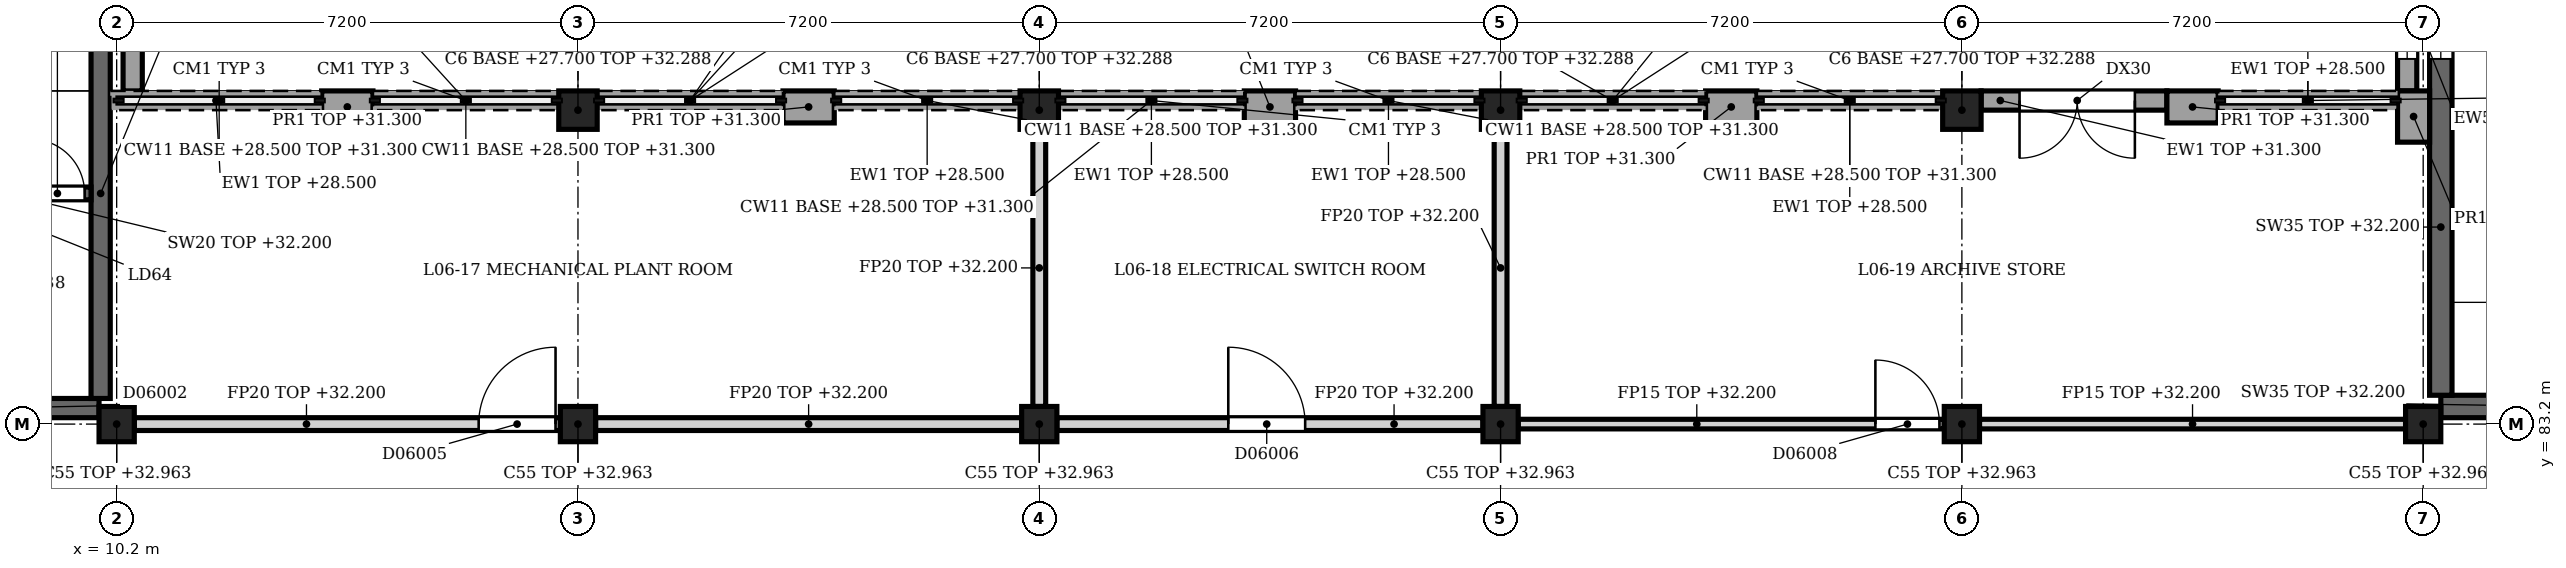
"""IFC4 building model, lengths in metres.
Left out: names, types, materials, properties, quantities, classifications, styles, units other than length and angle.
Written with IfcOpenShell. Run it as: python <this file> out.ifc"""

import sys

from ifc_helpers import new_model, si_unit, direction, frame, frame_2d, origin, origin_2d, place, context, subcontext, project, spatial, rectangle, extrude, element, fill, save


model = new_model("IFC4")
c1 = context("Model", 3, precision=1e-05, world=origin(), true_north=direction((0.0, 1.0)))
c2 = subcontext(c1, "Body", "Model", "MODEL_VIEW")
j1 = project(units=[si_unit("LENGTHUNIT", "METRE"), si_unit("PLANEANGLEUNIT", "RADIAN")], contexts=[c1])
p1 = place(None, origin())
s1 = spatial("IfcSite", under=j1, at=p1, CompositionType="ELEMENT")
p2 = place(p1, origin())
s2 = spatial("IfcBuilding", under=s1, at=p2, CompositionType="ELEMENT")
p3 = place(p2, frame((0.0, 0.0, 27.9)))
s3 = spatial("IfcBuildingStorey", under=s2, at=p3, CompositionType="ELEMENT", Elevation=27.9)
for number, where, z_axis, x_axis in (
    (1, (10.2, 83.2, 0.0), (0.0, 0.0, 1.0), (1.0, 0.0, 0.0)),
    (2, (17.4, 83.2, 0.0), (0.0, 0.0, 1.0), (1.0, 0.0, 0.0)),
    (3, (24.6, 83.2, 0.0), (0.0, 0.0, 1.0), (1.0, 0.0, 0.0)),
    (4, (31.8, 83.2, 0.0), (0.0, 0.0, 1.0), (1.0, 0.0, 0.0)),
    (5, (39.0, 83.2, 0.0), (0.0, 0.0, 1.0), (1.0, 0.0, 0.0)),
    (6, (46.2, 83.2, 0.0), (0.0, 0.0, 1.0), (1.0, 0.0, 0.0)),
):
    element("IfcColumn", number, at=place(p3, frame(where, z_axis=z_axis, x_axis=x_axis)), inside=s3, PredefinedType="COLUMN", context=c2, shape_type="SweptSolid", body=[
        extrude(rectangle(XDim=0.55, YDim=0.55, at=origin_2d()), origin(), (0.0, 0.0, 1.0), 5.063),
    ])
for number, where, z_axis, x_axis in (
    (7, (17.4, 88.1, -0.2), (0.0, 0.0, 1.0), (1.0, 0.0, 0.0)),
    (8, (24.6, 88.1, -0.2), (0.0, 0.0, 1.0), (1.0, 0.0, 0.0)),
    (9, (31.8, 88.1, -0.2), (0.0, 0.0, 1.0), (1.0, 0.0, 0.0)),
    (10, (39.0, 88.1, -0.2), (0.0, 0.0, 1.0), (1.0, 0.0, 0.0)),
):
    element("IfcColumn", number, at=place(p3, frame(where, z_axis=z_axis, x_axis=x_axis)), inside=s3, PredefinedType="COLUMN", context=c2, shape_type="SweptSolid", body=[
        extrude(rectangle(XDim=0.6, YDim=0.6, at=origin_2d()), origin(), (0.0, 0.0, 1.0), 4.588),
    ])
p4 = place(p3, frame((10.45, 90.0, 0.0), z_axis=(0.0, 0.0, 1.0), x_axis=(0.0, -1.0, 0.0)))
e11 = element("IfcWall", 11, at=p4, inside=s3, PredefinedType="SOLIDWALL", context=c2, shape_type="SweptSolid", body=[
    extrude(rectangle(XDim=1.6, YDim=0.3, at=frame_2d((0.8, 0.0))), origin(), (0.0, 0.0, 1.0), 3.4),
])
p5 = place(p3, frame((13.4, 88.15, 0.0), z_axis=(0.0, 0.0, 1.0), x_axis=(1.0, 0.0, 0.0)))
e12 = element("IfcWall", 12, at=p5, inside=s3, PredefinedType="SOLIDWALL", context=c2, shape_type="SweptSolid", body=[
    extrude(rectangle(XDim=0.8, YDim=0.5, at=frame_2d((0.4, 0.0))), origin(), (0.0, 0.0, 1.0), 3.4),
])
p6 = place(p3, frame((20.6, 88.15, 0.0), z_axis=(0.0, 0.0, 1.0), x_axis=(1.0, 0.0, 0.0)))
e13 = element("IfcWall", 13, at=p6, inside=s3, PredefinedType="SOLIDWALL", context=c2, shape_type="SweptSolid", body=[
    extrude(rectangle(XDim=0.8, YDim=0.5, at=frame_2d((0.4, 0.0))), origin(), (0.0, 0.0, 1.0), 3.4),
])
for number, where, z_axis, x_axis in (
    (14, (27.8, 88.15, 0.0), (0.0, 0.0, 1.0), (1.0, 0.0, 0.0)),
    (15, (35.0, 88.15, 0.0), (0.0, 0.0, 1.0), (1.0, 0.0, 0.0)),
    (16, (42.2, 88.15, 0.0), (0.0, 0.0, 1.0), (1.0, 0.0, 0.0)),
):
    element("IfcWall", number, at=place(p3, frame(where, z_axis=z_axis, x_axis=x_axis)), inside=s3, PredefinedType="SOLIDWALL", context=c2, shape_type="SweptSolid", body=[
        extrude(rectangle(XDim=0.8, YDim=0.5, at=frame_2d((0.4, 0.0))), origin(), (0.0, 0.0, 1.0), 3.4),
    ])
p7 = place(p3, frame((10.1, 88.25, 0.0), z_axis=(0.0, 0.0, 1.0), x_axis=(1.0, 0.0, 0.0)))
e17 = element("IfcWall", 17, at=p7, inside=s3, PredefinedType="SOLIDWALL", context=c2, shape_type="SweptSolid", body=[
    extrude(rectangle(XDim=3.3, YDim=0.3, at=frame_2d((1.65, 0.0))), origin(), (0.0, 0.0, 1.0), 0.6),
])
for number, where, z_axis, x_axis in (
    (18, (14.2, 88.25, 0.0), (0.0, 0.0, 1.0), (1.0, 0.0, 0.0)),
    (19, (17.7, 88.25, 0.0), (0.0, 0.0, 1.0), (1.0, 0.0, 0.0)),
    (20, (21.4, 88.25, 0.0), (0.0, 0.0, 1.0), (1.0, 0.0, 0.0)),
    (21, (24.9, 88.25, 0.0), (0.0, 0.0, 1.0), (1.0, 0.0, 0.0)),
):
    element("IfcWall", number, at=place(p3, frame(where, z_axis=z_axis, x_axis=x_axis)), inside=s3, PredefinedType="SOLIDWALL", context=c2, shape_type="SweptSolid", body=[
        extrude(rectangle(XDim=2.9, YDim=0.3, at=frame_2d((1.45, 0.0))), origin(), (0.0, 0.0, 1.0), 0.6),
    ])
for number, where, z_axis, x_axis in (
    (22, (28.6, 88.25, 0.0), (0.0, 0.0, 1.0), (1.0, 0.0, 0.0)),
    (23, (32.1, 88.25, 0.0), (0.0, 0.0, 1.0), (1.0, 0.0, 0.0)),
    (24, (35.8, 88.25, 0.0), (0.0, 0.0, 1.0), (1.0, 0.0, 0.0)),
):
    element("IfcWall", number, at=place(p3, frame(where, z_axis=z_axis, x_axis=x_axis)), inside=s3, PredefinedType="SOLIDWALL", context=c2, shape_type="SweptSolid", body=[
        extrude(rectangle(XDim=2.9, YDim=0.3, at=frame_2d((1.45, 0.0))), origin(), (0.0, 0.0, 1.0), 0.6),
    ])
p8 = place(p3, frame((39.3, 88.25, 0.0), z_axis=(0.0, 0.0, 1.0), x_axis=(1.0, 0.0, 0.0)))
e25 = element("IfcWall", 25, at=p8, inside=s3, PredefinedType="SOLIDWALL", context=c2, shape_type="SweptSolid", body=[
    extrude(rectangle(XDim=2.9, YDim=0.3, at=frame_2d((1.45, 0.0))), origin(), (0.0, 0.0, 1.0), 3.4),
])
p9 = place(p8, frame((0.6, 0.0, 0.0)))
e26 = element("IfcOpeningElement", 26, at=p9, cuts=e25, PredefinedType="OPENING", context=c2, shape_type="SweptSolid", body=[
    extrude(rectangle(XDim=1.8, YDim=2.4, at=frame_2d((0.9, 1.2))), frame((0.0, 0.16, 0.0), z_axis=(0.0, -1.0, 0.0), x_axis=(1.0, 0.0, 0.0)), (0.0, 0.0, 1.0), 0.32),
])
p10 = place(p3, frame((43.0, 88.25, 0.0), z_axis=(0.0, 0.0, 1.0), x_axis=(1.0, 0.0, 0.0)))
e27 = element("IfcWall", 27, at=p10, inside=s3, PredefinedType="SOLIDWALL", context=c2, shape_type="SweptSolid", body=[
    extrude(rectangle(XDim=2.8, YDim=0.3, at=frame_2d((1.4, 0.0))), origin(), (0.0, 0.0, 1.0), 0.6),
])
p11 = place(p3, frame((46.05, 87.6, 0.0), z_axis=(0.0, 0.0, 1.0), x_axis=(0.0, 1.0, 0.0)))
e28 = element("IfcWall", 28, at=p11, inside=s3, PredefinedType="SOLIDWALL", context=c2, shape_type="SweptSolid", body=[
    extrude(rectangle(XDim=0.8, YDim=0.5, at=frame_2d((0.4, 0.0))), origin(), (0.0, 0.0, 1.0), 3.4),
])
p12 = place(p3, frame((45.95, 88.4, 0.0), z_axis=(0.0, 0.0, 1.0), x_axis=(0.0, 1.0, 0.0)))
e29 = element("IfcWall", 29, at=p12, inside=s3, PredefinedType="SOLIDWALL", context=c2, shape_type="SweptSolid", body=[
    extrude(rectangle(XDim=1.9, YDim=0.3, at=frame_2d((0.95, 0.0))), origin(), (0.0, 0.0, 1.0), 3.4),
])
p13 = place(p12, frame((0.5, 0.0, 1.2)))
e30 = element("IfcOpeningElement", 30, at=p13, cuts=e29, PredefinedType="OPENING", context=c2, shape_type="SweptSolid", body=[
    extrude(rectangle(XDim=0.6, YDim=1.8, at=frame_2d((0.3, 0.9))), frame((0.0, 0.16, 0.0), z_axis=(0.0, -1.0, 0.0), x_axis=(1.0, 0.0, 0.0)), (0.0, 0.0, 1.0), 0.32),
])
p14 = place(p3, frame((3.15, 83.45, 0.0), z_axis=(0.0, 0.0, 1.0), x_axis=(1.0, 0.0, 0.0)))
e31 = element("IfcWall", 31, at=p14, inside=s3, PredefinedType="SHEAR", context=c2, shape_type="SweptSolid", body=[
    extrude(rectangle(XDim=6.775, YDim=0.3, at=frame_2d((3.388, 0.0))), origin(), (0.0, 0.0, 1.0), 4.3),
])
p15 = place(p14, frame((4.45, 0.0, 0.0)))
e32 = element("IfcOpeningElement", 32, at=p15, cuts=e31, PredefinedType="OPENING", context=c2, shape_type="SweptSolid", body=[
    extrude(rectangle(XDim=1.2, YDim=2.1, at=frame_2d((0.6, 1.05))), frame((0.0, 0.16, 0.0), z_axis=(0.0, -1.0, 0.0), x_axis=(1.0, 0.0, 0.0)), (0.0, 0.0, 1.0), 0.32),
])
p16 = place(p3, frame((9.95, 83.6, 0.0), z_axis=(0.0, 0.0, 1.0), x_axis=(0.0, 1.0, 0.0)))
e33 = element("IfcWall", 33, at=p16, inside=s3, PredefinedType="SHEAR", context=c2, shape_type="SweptSolid", body=[
    extrude(rectangle(XDim=6.4, YDim=0.3, at=frame_2d((3.2, 0.0))), origin(), (0.0, 0.0, 1.0), 4.3),
])
p17 = place(p3, frame((9.8, 86.8, 0.0), z_axis=(0.0, 0.0, 1.0), x_axis=(-1.0, 0.0, 0.0)))
e34 = element("IfcWall", 34, at=p17, inside=s3, PredefinedType="SHEAR", context=c2, shape_type="SweptSolid", body=[
    extrude(rectangle(XDim=3.25, YDim=0.2, at=frame_2d((1.625, 0.0))), origin(), (0.0, 0.0, 1.0), 4.3),
])
p18 = place(p17, frame((1.7, 0.0, 0.0)))
e35 = element("IfcOpeningElement", 35, at=p18, cuts=e34, PredefinedType="OPENING", context=c2, shape_type="SweptSolid", body=[
    extrude(rectangle(XDim=1.1, YDim=2.1, at=frame_2d((0.55, 1.05))), frame((0.0, 0.11, 0.0), z_axis=(0.0, -1.0, 0.0), x_axis=(1.0, 0.0, 0.0)), (0.0, 0.0, 1.0), 0.22),
])
p19 = place(p17, frame((0.1, 0.0, 0.0)))
e36 = element("IfcOpeningElement", 36, at=p19, cuts=e34, PredefinedType="OPENING", context=c2, shape_type="SweptSolid", body=[
    extrude(rectangle(XDim=0.85, YDim=2.1, at=frame_2d((0.425, 1.05))), frame((0.0, 0.11, 0.0), z_axis=(0.0, -1.0, 0.0), x_axis=(1.0, 0.0, 0.0)), (0.0, 0.0, 1.0), 0.22),
])
p20 = place(p3, frame((46.475, 83.475, 0.0), z_axis=(0.0, 0.0, 1.0), x_axis=(1.0, 0.0, 0.0)))
e37 = element("IfcWall", 37, at=p20, inside=s3, PredefinedType="SHEAR", context=c2, shape_type="SweptSolid", body=[
    extrude(rectangle(XDim=6.65, YDim=0.35, at=frame_2d((3.325, 0.0))), origin(), (0.0, 0.0, 1.0), 4.3),
])
p21 = place(p20, frame((3.925, 0.0, 0.0)))
e38 = element("IfcOpeningElement", 38, at=p21, cuts=e37, PredefinedType="OPENING", context=c2, shape_type="SweptSolid", body=[
    extrude(rectangle(XDim=1.2, YDim=2.1, at=frame_2d((0.6, 1.05))), frame((0.0, 0.185, 0.0), z_axis=(0.0, -1.0, 0.0), x_axis=(1.0, 0.0, 0.0)), (0.0, 0.0, 1.0), 0.37),
])
p22 = place(p3, frame((46.475, 83.65, 0.0), z_axis=(0.0, 0.0, 1.0), x_axis=(0.0, 1.0, 0.0)))
e39 = element("IfcWall", 39, at=p22, inside=s3, PredefinedType="SHEAR", context=c2, shape_type="SweptSolid", body=[
    extrude(rectangle(XDim=6.3, YDim=0.35, at=frame_2d((3.15, 0.0))), origin(), (0.0, 0.0, 1.0), 4.3),
])
p23 = place(p22, frame((5.25, 0.0, 1.2)))
e40 = element("IfcOpeningElement", 40, at=p23, cuts=e39, PredefinedType="OPENING", context=c2, shape_type="SweptSolid", body=[
    extrude(rectangle(XDim=0.6, YDim=1.8, at=frame_2d((0.3, 0.9))), frame((0.0, 0.185, 0.0), z_axis=(0.0, -1.0, 0.0), x_axis=(1.0, 0.0, 0.0)), (0.0, 0.0, 1.0), 0.37),
])
p24 = place(p3, frame((10.475, 83.2, 0.0), z_axis=(0.0, 0.0, 1.0), x_axis=(1.0, 0.0, 0.0)))
e41 = element("IfcWall", 41, at=p24, inside=s3, PredefinedType="PARTITIONING", context=c2, shape_type="SweptSolid", body=[
    extrude(rectangle(XDim=6.65, YDim=0.2, at=frame_2d((3.325, 0.0))), origin(), (0.0, 0.0, 1.0), 4.3),
])
p25 = place(p24, frame((5.375, 0.0, 0.0)))
e42 = element("IfcOpeningElement", 42, at=p25, cuts=e41, PredefinedType="OPENING", context=c2, shape_type="SweptSolid", body=[
    extrude(rectangle(XDim=1.2, YDim=2.3, at=frame_2d((0.6, 1.15))), frame((0.0, 0.11, 0.0), z_axis=(0.0, -1.0, 0.0), x_axis=(1.0, 0.0, 0.0)), (0.0, 0.0, 1.0), 0.22),
])
p26 = place(p3, frame((17.675, 83.2, 0.0), z_axis=(0.0, 0.0, 1.0), x_axis=(1.0, 0.0, 0.0)))
e43 = element("IfcWall", 43, at=p26, inside=s3, PredefinedType="PARTITIONING", context=c2, shape_type="SweptSolid", body=[
    extrude(rectangle(XDim=6.65, YDim=0.2, at=frame_2d((3.325, 0.0))), origin(), (0.0, 0.0, 1.0), 4.3),
])
p27 = place(p3, frame((24.875, 83.2, 0.0), z_axis=(0.0, 0.0, 1.0), x_axis=(1.0, 0.0, 0.0)))
e44 = element("IfcWall", 44, at=p27, inside=s3, PredefinedType="PARTITIONING", context=c2, shape_type="SweptSolid", body=[
    extrude(rectangle(XDim=6.65, YDim=0.2, at=frame_2d((3.325, 0.0))), origin(), (0.0, 0.0, 1.0), 4.3),
])
p28 = place(p27, frame((2.675, 0.0, 0.0)))
e45 = element("IfcOpeningElement", 45, at=p28, cuts=e44, PredefinedType="OPENING", context=c2, shape_type="SweptSolid", body=[
    extrude(rectangle(XDim=1.2, YDim=2.3, at=frame_2d((0.6, 1.15))), frame((0.0, 0.11, 0.0), z_axis=(0.0, -1.0, 0.0), x_axis=(1.0, 0.0, 0.0)), (0.0, 0.0, 1.0), 0.22),
])
p29 = place(p3, frame((32.075, 83.2, 0.0), z_axis=(0.0, 0.0, 1.0), x_axis=(1.0, 0.0, 0.0)))
e46 = element("IfcWall", 46, at=p29, inside=s3, PredefinedType="PARTITIONING", context=c2, shape_type="SweptSolid", body=[
    extrude(rectangle(XDim=6.65, YDim=0.15, at=frame_2d((3.325, 0.0))), origin(), (0.0, 0.0, 1.0), 4.3),
])
p30 = place(p29, frame((5.575, 0.0, 0.0)))
e47 = element("IfcOpeningElement", 47, at=p30, cuts=e46, PredefinedType="OPENING", context=c2, shape_type="SweptSolid", body=[
    extrude(rectangle(XDim=1.0, YDim=2.1, at=frame_2d((0.5, 1.05))), frame((0.0, 0.085, 0.0), z_axis=(0.0, -1.0, 0.0), x_axis=(1.0, 0.0, 0.0)), (0.0, 0.0, 1.0), 0.17),
])
p31 = place(p3, frame((39.275, 83.2, 0.0), z_axis=(0.0, 0.0, 1.0), x_axis=(1.0, 0.0, 0.0)))
e48 = element("IfcWall", 48, at=p31, inside=s3, PredefinedType="PARTITIONING", context=c2, shape_type="SweptSolid", body=[
    extrude(rectangle(XDim=6.65, YDim=0.15, at=frame_2d((3.325, 0.0))), origin(), (0.0, 0.0, 1.0), 4.3),
])
for number, where, z_axis, x_axis in (
    (49, (24.6, 83.475, 0.0), (0.0, 0.0, 1.0), (0.0, 1.0, 0.0)),
    (50, (31.8, 83.475, 0.0), (0.0, 0.0, 1.0), (0.0, 1.0, 0.0)),
):
    element("IfcWall", number, at=place(p3, frame(where, z_axis=z_axis, x_axis=x_axis)), inside=s3, PredefinedType="PARTITIONING", context=c2, shape_type="SweptSolid", body=[
        extrude(rectangle(XDim=4.325, YDim=0.2, at=frame_2d((2.163, 0.0))), origin(), (0.0, 0.0, 1.0), 4.3),
    ])
p32 = place(p9, origin())
e51 = element("IfcDoor", 51, at=p32, inside=s3, OperationType="SINGLE_SWING_LEFT", PredefinedType="DOOR", context=c2, shape_type="SweptSolid", body=[
    extrude(rectangle(XDim=1.8, YDim=2.4, at=frame_2d((0.9, 1.2))), frame((0.0, 0.025, 0.0), z_axis=(0.0, -1.0, 0.0), x_axis=(1.0, 0.0, 0.0)), (0.0, 0.0, 1.0), 0.05),
])
fill(e26, e51)
p33 = place(p13, origin())
e52 = element("IfcWindow", 52, at=p33, inside=s3, PartitioningType="SINGLE_PANEL", PredefinedType="WINDOW", context=c2, shape_type="SweptSolid", body=[
    extrude(rectangle(XDim=0.6, YDim=1.8, at=frame_2d((0.3, 0.9))), frame((0.0, 0.03, 0.0), z_axis=(0.0, -1.0, 0.0), x_axis=(1.0, 0.0, 0.0)), (0.0, 0.0, 1.0), 0.06),
])
fill(e30, e52)
p34 = place(p19, origin())
e53 = element("IfcDoor", 53, at=p34, inside=s3, OperationType="SINGLE_SWING_LEFT", PredefinedType="DOOR", context=c2, shape_type="SweptSolid", body=[
    extrude(rectangle(XDim=0.85, YDim=2.1, at=frame_2d((0.425, 1.05))), frame((0.0, 0.025, 0.0), z_axis=(0.0, -1.0, 0.0), x_axis=(1.0, 0.0, 0.0)), (0.0, 0.0, 1.0), 0.05),
])
fill(e36, e53)
p35 = place(p23, origin())
e54 = element("IfcWindow", 54, at=p35, inside=s3, PartitioningType="SINGLE_PANEL", PredefinedType="WINDOW", context=c2, shape_type="SweptSolid", body=[
    extrude(rectangle(XDim=0.6, YDim=1.8, at=frame_2d((0.3, 0.9))), frame((0.0, 0.03, 0.0), z_axis=(0.0, -1.0, 0.0), x_axis=(1.0, 0.0, 0.0)), (0.0, 0.0, 1.0), 0.06),
])
fill(e40, e54)
p36 = place(p25, origin())
e55 = element("IfcDoor", 55, at=p36, inside=s3, OperationType="SINGLE_SWING_RIGHT", PredefinedType="DOOR", context=c2, shape_type="SweptSolid", body=[
    extrude(rectangle(XDim=1.2, YDim=2.3, at=frame_2d((0.6, 1.15))), frame((0.0, 0.025, 0.0), z_axis=(0.0, -1.0, 0.0), x_axis=(1.0, 0.0, 0.0)), (0.0, 0.0, 1.0), 0.05),
])
fill(e42, e55)
p37 = place(p28, origin())
e56 = element("IfcDoor", 56, at=p37, inside=s3, OperationType="SINGLE_SWING_LEFT", PredefinedType="DOOR", context=c2, shape_type="SweptSolid", body=[
    extrude(rectangle(XDim=1.2, YDim=2.3, at=frame_2d((0.6, 1.15))), frame((0.0, 0.025, 0.0), z_axis=(0.0, -1.0, 0.0), x_axis=(1.0, 0.0, 0.0)), (0.0, 0.0, 1.0), 0.05),
])
fill(e45, e56)
p38 = place(p30, origin())
e57 = element("IfcDoor", 57, at=p38, inside=s3, OperationType="SINGLE_SWING_RIGHT", PredefinedType="DOOR", context=c2, shape_type="SweptSolid", body=[
    extrude(rectangle(XDim=1.0, YDim=2.1, at=frame_2d((0.5, 1.05))), frame((0.0, 0.025, 0.0), z_axis=(0.0, -1.0, 0.0), x_axis=(1.0, 0.0, 0.0)), (0.0, 0.0, 1.0), 0.05),
])
fill(e47, e57)
save(model, sys.argv[1])
